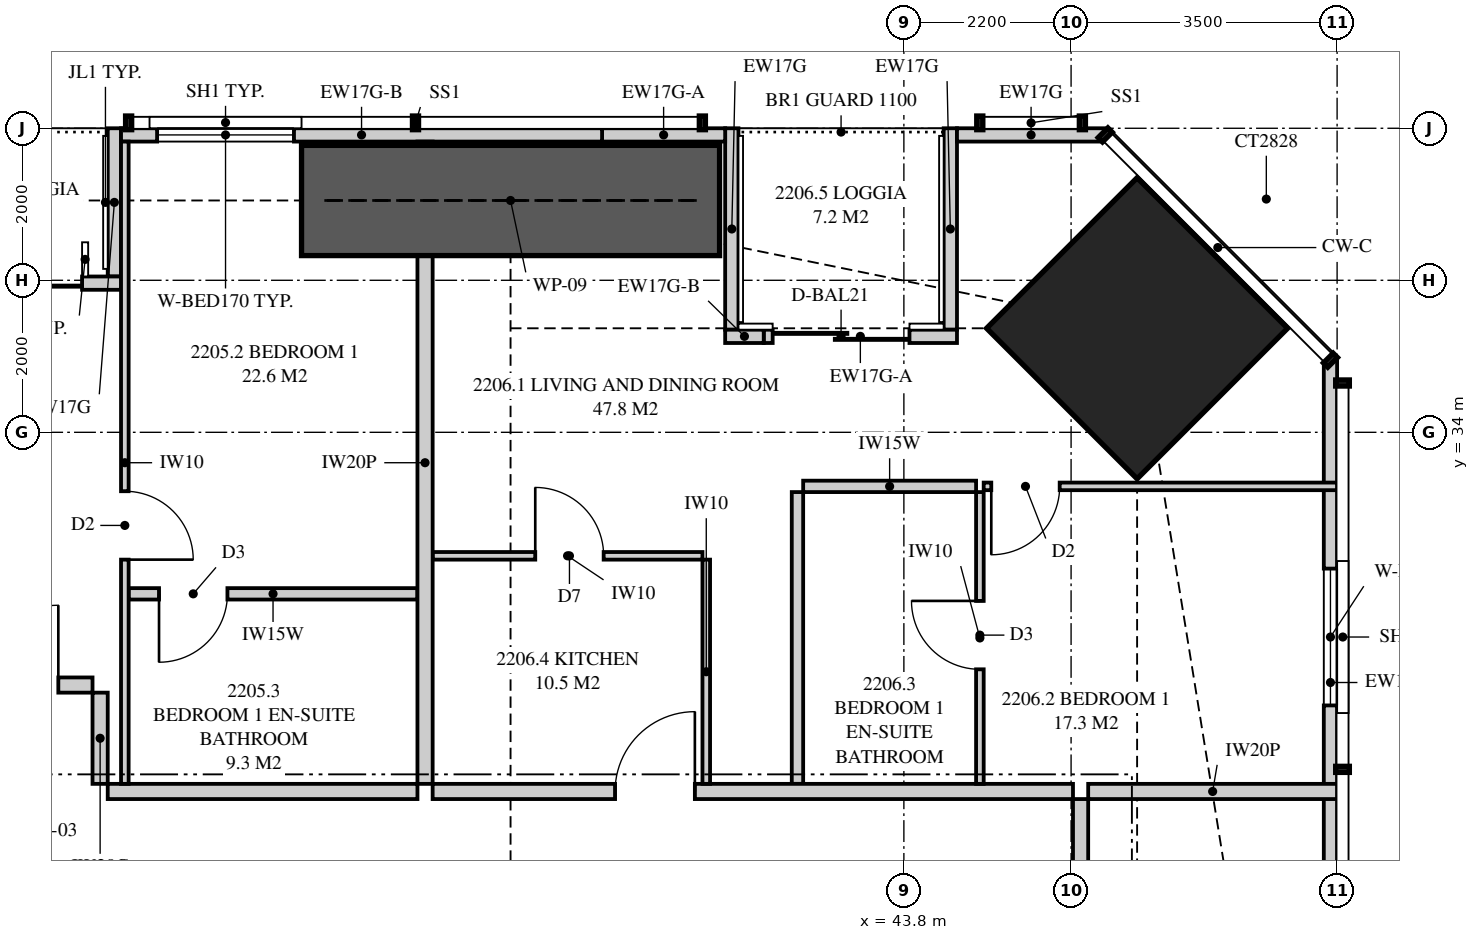
"""IFC4 building model, lengths in metres.
Left out: names, types, materials, properties, quantities, classifications, styles, units other than length and angle.
Written with IfcOpenShell. Run it as: python <this file> out.ifc"""

import sys

from ifc_helpers import new_model, si_unit, direction, frame, frame_2d, origin, origin_2d, place, context, subcontext, project, spatial, polyline, rectangle, hollow_rectangle, outline, extrude, element, fill, save


model = new_model("IFC4")
c1 = context("Model", 3, precision=1e-05, world=origin(), true_north=direction((0.0, 1.0)))
c2 = subcontext(c1, "Body", "Model", "MODEL_VIEW")
j1 = project(units=[si_unit("LENGTHUNIT", "METRE"), si_unit("PLANEANGLEUNIT", "RADIAN")], contexts=[c1])
p1 = place(None, origin())
s1 = spatial("IfcSite", under=j1, at=p1, CompositionType="ELEMENT")
p2 = place(p1, origin())
s2 = spatial("IfcBuilding", under=s1, at=p2, CompositionType="ELEMENT")
p3 = place(p2, frame((0.0, 0.0, 84.75)))
s3 = spatial("IfcBuildingStorey", under=s2, at=p3, CompositionType="ELEMENT", Elevation=84.75)
p4 = place(p3, frame((46.869, 35.369, 0.0), z_axis=(0.0, 0.0, 1.0), x_axis=(-0.707106781187, -0.707106781187, 0.0)))
e1 = element("IfcColumn", 1, at=p4, inside=s3, PredefinedType="COLUMN", context=c2, shape_type="SweptSolid", body=[
    extrude(hollow_rectangle(XDim=2.8, YDim=2.8, WallThickness=0.25, at=origin_2d()), origin(), (0.0, 0.0, 1.0), 3.35),
])
p5 = place(p3, frame((49.413, 26.468, 0.0), z_axis=(0.0, 0.0, 1.0), x_axis=(0.0, 1.0, 0.0)))
e2 = element("IfcWall", 2, at=p5, inside=s3, PredefinedType="SOLIDWALL", context=c2, shape_type="SweptSolid", body=[
    extrude(rectangle(XDim=8.481, YDim=0.175, at=frame_2d((4.24, 0.0))), origin(), (0.0, 0.0, 1.0), 3.11),
])
p6 = place(p5, frame((3.939, 0.0, 0.4)))
e3 = element("IfcOpeningElement", 3, at=p6, cuts=e2, PredefinedType="OPENING", context=c2, shape_type="SweptSolid", body=[
    extrude(rectangle(XDim=1.8, YDim=1.7, at=frame_2d((0.9, 0.85))), frame((0.0, 0.097, 0.0), z_axis=(0.0, -1.0, 0.0), x_axis=(1.0, 0.0, 0.0)), (0.0, 0.0, 1.0), 0.195),
])
p7 = place(p3, frame((46.449, 37.913, 0.0), z_axis=(0.0, 0.0, 1.0), x_axis=(-1.0, 0.0, 0.0)))
e4 = element("IfcWall", 4, at=p7, inside=s3, PredefinedType="SOLIDWALL", context=c2, shape_type="SweptSolid", body=[
    extrude(rectangle(XDim=1.95, YDim=0.175, at=frame_2d((0.975, 0.0))), origin(), (0.0, 0.0, 1.0), 3.11),
])
p8 = place(p3, frame((41.449, 37.913, 0.0), z_axis=(0.0, 0.0, 1.0), x_axis=(-1.0, 0.0, 0.0)))
e5 = element("IfcWall", 5, at=p8, inside=s3, PredefinedType="SOLIDWALL", context=c2, shape_type="SweptSolid", body=[
    extrude(rectangle(XDim=1.62, YDim=0.175, at=frame_2d((0.81, 0.0))), origin(), (0.0, 0.0, 1.0), 3.11),
])
p9 = place(p3, frame((39.829, 37.913, 0.0), z_axis=(0.0, 0.0, 1.0), x_axis=(-1.0, 0.0, 0.0)))
e6 = element("IfcWall", 6, at=p9, inside=s3, PredefinedType="SOLIDWALL", context=c2, shape_type="SweptSolid", body=[
    extrude(rectangle(XDim=6.329, YDim=0.175, at=frame_2d((3.165, 0.0))), origin(), (0.0, 0.0, 1.0), 2.15),
])
p10 = place(p9, frame((4.054, 0.0, 0.4)))
e7 = element("IfcOpeningElement", 7, at=p10, cuts=e6, PredefinedType="OPENING", context=c2, shape_type="SweptSolid", body=[
    extrude(rectangle(XDim=1.8, YDim=1.7, at=frame_2d((0.9, 0.85))), frame((0.0, 0.097, 0.0), z_axis=(0.0, -1.0, 0.0), x_axis=(1.0, 0.0, 0.0)), (0.0, 0.0, 1.0), 0.195),
])
p11 = place(p3, frame((44.499, 35.262, 0.0), z_axis=(0.0, 0.0, 1.0), x_axis=(-1.0, 0.0, 0.0)))
e8 = element("IfcWall", 8, at=p11, inside=s3, PredefinedType="SOLIDWALL", context=c2, shape_type="SweptSolid", body=[
    extrude(rectangle(XDim=2.543, YDim=0.175, at=frame_2d((1.271, 0.0))), origin(), (0.0, 0.0, 1.0), 2.15),
])
p12 = place(p11, frame((0.625, 0.0, 0.0)))
e9 = element("IfcOpeningElement", 9, at=p12, cuts=e8, PredefinedType="OPENING", context=c2, shape_type="SweptSolid", body=[
    extrude(rectangle(XDim=1.8, YDim=2.1, at=frame_2d((0.9, 1.05))), frame((0.0, 0.097, 0.0), z_axis=(0.0, -1.0, 0.0), x_axis=(1.0, 0.0, 0.0)), (0.0, 0.0, 1.0), 0.195),
])
p13 = place(p3, frame((41.956, 35.262, 0.0), z_axis=(0.0, 0.0, 1.0), x_axis=(-1.0, 0.0, 0.0)))
e10 = element("IfcWall", 10, at=p13, inside=s3, PredefinedType="SOLIDWALL", context=c2, shape_type="SweptSolid", body=[
    extrude(rectangle(XDim=0.507, YDim=0.175, at=frame_2d((0.254, 0.0))), origin(), (0.0, 0.0, 1.0), 2.51),
])
p14 = place(p3, frame((44.411, 38.0, 0.0), z_axis=(0.0, 0.0, 1.0), x_axis=(0.0, -1.0, 0.0)))
e11 = element("IfcWall", 11, at=p14, inside=s3, PredefinedType="SOLIDWALL", context=c2, shape_type="SweptSolid", body=[
    extrude(outline(polyline([(0.0, 0.0), (2.65, 0.0), (2.65, 2.15), (1.092, 2.15), (1.092, 3.11), (0.0, 3.11), (0.0, 0.0)])), frame((0.0, 0.087, 0.0), z_axis=(0.0, -1.0, 0.0), x_axis=(1.0, 0.0, 0.0)), (0.0, 0.0, 1.0), 0.175),
])
p15 = place(p3, frame((41.536, 38.0, 0.0), z_axis=(0.0, 0.0, 1.0), x_axis=(0.0, -1.0, 0.0)))
e12 = element("IfcWall", 12, at=p15, inside=s3, PredefinedType="SOLIDWALL", context=c2, shape_type="SweptSolid", body=[
    extrude(outline(polyline([(0.0, 0.0), (2.65, 0.0), (2.65, 2.51), (2.582, 2.51), (2.582, 2.15), (0.505, 2.15), (0.505, 3.11), (0.0, 3.11), (0.0, 0.0)])), frame((0.0, 0.087, 0.0), z_axis=(0.0, -1.0, 0.0), x_axis=(1.0, 0.0, 0.0)), (0.0, 0.0, 1.0), 0.175),
])
p16 = place(p3, frame((33.5, 35.962, 0.0), z_axis=(0.0, 0.0, 1.0), x_axis=(-1.0, 0.0, 0.0)))
e13 = element("IfcWall", 13, at=p16, inside=s3, PredefinedType="SOLIDWALL", context=c2, shape_type="SweptSolid", body=[
    extrude(rectangle(XDim=2.825, YDim=0.175, at=frame_2d((1.413, 0.0))), origin(), (0.0, 0.0, 1.0), 2.15),
])
p17 = place(p16, frame((0.512, 0.0, 0.0)))
e14 = element("IfcOpeningElement", 14, at=p17, cuts=e13, PredefinedType="OPENING", context=c2, shape_type="SweptSolid", body=[
    extrude(rectangle(XDim=1.8, YDim=2.1, at=frame_2d((0.9, 1.05))), frame((0.0, 0.097, 0.0), z_axis=(0.0, -1.0, 0.0), x_axis=(1.0, 0.0, 0.0)), (0.0, 0.0, 1.0), 0.195),
])
p18 = place(p3, frame((33.413, 38.0, 0.0), z_axis=(0.0, 0.0, 1.0), x_axis=(0.0, -1.0, 0.0)))
e15 = element("IfcWall", 15, at=p18, inside=s3, PredefinedType="SOLIDWALL", context=c2, shape_type="SweptSolid", body=[
    extrude(rectangle(XDim=1.95, YDim=0.175, at=frame_2d((0.975, 0.0))), origin(), (0.0, 0.0, 1.0), 2.15),
])
p19 = place(p3, frame((37.5, 37.825, 0.0), z_axis=(0.0, 0.0, 1.0), x_axis=(0.0, -1.0, 0.0)))
e16 = element("IfcWall", 16, at=p19, inside=s3, PredefinedType="PARTITIONING", context=c2, shape_type="SweptSolid", body=[
    extrude(outline(polyline([(0.529, 2.15), (0.0, 2.15), (0.0, 0.0), (0.529, 0.0), (0.529, 0.431), (1.021, 0.431), (1.021, 0.0), (8.45, 0.0), (8.45, 3.11), (1.885, 3.11), (1.885, 2.15), (1.021, 2.15), (1.021, 1.269), (0.529, 1.269), (0.529, 2.15)])), frame((0.0, 0.1, 0.0), z_axis=(0.0, -1.0, 0.0), x_axis=(1.0, 0.0, 0.0)), (0.0, 0.0, 1.0), 0.2),
])
p20 = place(p3, frame((33.55, 37.825, 0.0), z_axis=(0.0, 0.0, 1.0), x_axis=(0.0, -1.0, 0.0)))
e17 = element("IfcWall", 17, at=p20, inside=s3, PredefinedType="PARTITIONING", context=c2, shape_type="SweptSolid", body=[
    extrude(outline(polyline([(0.0, 0.0), (8.45, 0.0), (8.45, 3.11), (1.835, 3.11), (1.835, 2.15), (0.0, 2.15), (0.0, 3.11), (0.0, 0.0)])), frame((0.0, 0.05, 0.0), z_axis=(0.0, -1.0, 0.0), x_axis=(1.0, 0.0, 0.0)), (0.0, 0.0, 1.0), 0.1),
])
p21 = place(p20, frame((4.6, 0.0, 0.0)))
e18 = element("IfcOpeningElement", 18, at=p21, cuts=e17, PredefinedType="OPENING", context=c2, shape_type="SweptSolid", body=[
    extrude(rectangle(XDim=0.9, YDim=2.1, at=frame_2d((0.45, 1.05))), frame((0.0, 0.06, 0.0), z_axis=(0.0, -1.0, 0.0), x_axis=(1.0, 0.0, 0.0)), (0.0, 0.0, 1.0), 0.12),
])
p22 = place(p3, frame((33.6, 31.875, 0.0), z_axis=(0.0, 0.0, 1.0), x_axis=(1.0, 0.0, 0.0)))
e19 = element("IfcWall", 19, at=p22, inside=s3, PredefinedType="PLUMBINGWALL", context=c2, shape_type="SweptSolid", body=[
    extrude(rectangle(XDim=3.8, YDim=0.15, at=frame_2d((1.9, 0.0))), origin(), (0.0, 0.0, 1.0), 3.11),
])
p23 = place(p22, frame((0.4, 0.0, 0.0)))
e20 = element("IfcOpeningElement", 20, at=p23, cuts=e19, PredefinedType="OPENING", context=c2, shape_type="SweptSolid", body=[
    extrude(rectangle(XDim=0.9, YDim=2.1, at=frame_2d((0.45, 1.05))), frame((0.0, 0.085, 0.0), z_axis=(0.0, -1.0, 0.0), x_axis=(1.0, 0.0, 0.0)), (0.0, 0.0, 1.0), 0.17),
])
p24 = place(p3, frame((37.6, 29.275, 0.0), z_axis=(0.0, 0.0, 1.0), x_axis=(1.0, 0.0, 0.0)))
e21 = element("IfcWall", 21, at=p24, inside=s3, PredefinedType="PARTITIONING", context=c2, shape_type="SweptSolid", body=[
    extrude(outline(polyline([(0.0, 0.0), (8.425, 0.0), (8.425, 3.11), (1.371, 3.11), (1.371, 2.531), (0.679, 2.531), (0.679, 3.11), (0.0, 3.11), (0.0, 0.0)])), frame((0.0, 0.1, 0.0), z_axis=(0.0, -1.0, 0.0), x_axis=(1.0, 0.0, 0.0)), (0.0, 0.0, 1.0), 0.2),
])
p25 = place(p24, frame((2.4, 0.0, 0.0)))
e22 = element("IfcOpeningElement", 22, at=p25, cuts=e21, PredefinedType="OPENING", context=c2, shape_type="SweptSolid", body=[
    extrude(rectangle(XDim=1.05, YDim=2.2, at=frame_2d((0.525, 1.1))), frame((0.0, 0.11, 0.0), z_axis=(0.0, -1.0, 0.0), x_axis=(1.0, 0.0, 0.0)), (0.0, 0.0, 1.0), 0.22),
])
p26 = place(p3, frame((44.8, 33.214, 0.0), z_axis=(0.0, 0.0, 1.0), x_axis=(0.0, -1.0, 0.0)))
e23 = element("IfcWall", 23, at=p26, inside=s3, PredefinedType="PARTITIONING", context=c2, shape_type="SweptSolid", body=[
    extrude(rectangle(XDim=3.839, YDim=0.1, at=frame_2d((1.919, 0.0))), origin(), (0.0, 0.0, 1.0), 3.11),
])
p27 = place(p26, frame((1.432, 0.0, 0.0)))
e24 = element("IfcOpeningElement", 24, at=p27, cuts=e23, PredefinedType="OPENING", context=c2, shape_type="SweptSolid", body=[
    extrude(rectangle(XDim=0.9, YDim=2.1, at=frame_2d((0.45, 1.05))), frame((0.0, 0.06, 0.0), z_axis=(0.0, -1.0, 0.0), x_axis=(1.0, 0.0, 0.0)), (0.0, 0.0, 1.0), 0.12),
])
p28 = place(p3, frame((44.85, 33.289, 0.0), z_axis=(0.0, 0.0, 1.0), x_axis=(1.0, 0.0, 0.0)))
e25 = element("IfcWall", 25, at=p28, inside=s3, PredefinedType="PARTITIONING", context=c2, shape_type="SweptSolid", body=[
    extrude(outline(polyline([(0.0, 0.0), (4.65, 0.0), (4.65, 3.11), (3.43, 3.11), (3.43, 2.15), (1.282, 2.15), (1.282, 3.11), (0.0, 3.11), (0.0, 0.0)])), frame((0.0, 0.05, 0.0), z_axis=(0.0, -1.0, 0.0), x_axis=(1.0, 0.0, 0.0)), (0.0, 0.0, 1.0), 0.1),
])
p29 = place(p28, frame((0.1, 0.0, 0.0)))
e26 = element("IfcOpeningElement", 26, at=p29, cuts=e25, PredefinedType="OPENING", context=c2, shape_type="SweptSolid", body=[
    extrude(rectangle(XDim=0.9, YDim=2.1, at=frame_2d((0.45, 1.05))), frame((0.0, 0.06, 0.0), z_axis=(0.0, -1.0, 0.0), x_axis=(1.0, 0.0, 0.0)), (0.0, 0.0, 1.0), 0.12),
])
p30 = place(p3, frame((42.475, 33.289, 0.0), z_axis=(0.0, 0.0, 1.0), x_axis=(1.0, 0.0, 0.0)))
e27 = element("IfcWall", 27, at=p30, inside=s3, PredefinedType="PLUMBINGWALL", context=c2, shape_type="SweptSolid", body=[
    extrude(rectangle(XDim=2.275, YDim=0.15, at=frame_2d((1.137, 0.0))), origin(), (0.0, 0.0, 1.0), 3.11),
])
p31 = place(p3, frame((42.4, 33.214, 0.0), z_axis=(0.0, 0.0, 1.0), x_axis=(0.0, -1.0, 0.0)))
e28 = element("IfcWall", 28, at=p31, inside=s3, PredefinedType="PLUMBINGWALL", context=c2, shape_type="SweptSolid", body=[
    extrude(rectangle(XDim=3.839, YDim=0.15, at=frame_2d((1.919, 0.0))), origin(), (0.0, 0.0, 1.0), 3.11),
])
p32 = place(p3, frame((37.6, 32.375, 0.0), z_axis=(0.0, 0.0, 1.0), x_axis=(1.0, 0.0, 0.0)))
e29 = element("IfcWall", 29, at=p32, inside=s3, PredefinedType="PARTITIONING", context=c2, shape_type="SweptSolid", body=[
    extrude(outline(polyline([(0.0, 0.0), (3.55, 0.0), (3.55, 3.11), (1.321, 3.11), (1.321, 2.531), (0.729, 2.531), (0.729, 3.11), (0.0, 3.11), (0.0, 0.0)])), frame((0.0, 0.05, 0.0), z_axis=(0.0, -1.0, 0.0), x_axis=(1.0, 0.0, 0.0)), (0.0, 0.0, 1.0), 0.1),
])
p33 = place(p32, frame((1.35, 0.0, 0.0)))
e30 = element("IfcOpeningElement", 30, at=p33, cuts=e29, PredefinedType="OPENING", context=c2, shape_type="SweptSolid", body=[
    extrude(rectangle(XDim=0.9, YDim=2.1, at=frame_2d((0.45, 1.05))), frame((0.0, 0.06, 0.0), z_axis=(0.0, -1.0, 0.0), x_axis=(1.0, 0.0, 0.0)), (0.0, 0.0, 1.0), 0.12),
])
p34 = place(p3, frame((41.2, 32.325, 0.0), z_axis=(0.0, 0.0, 1.0), x_axis=(0.0, -1.0, 0.0)))
e31 = element("IfcWall", 31, at=p34, inside=s3, PredefinedType="PARTITIONING", context=c2, shape_type="SweptSolid", body=[
    extrude(rectangle(XDim=2.95, YDim=0.1, at=frame_2d((1.475, 0.0))), origin(), (0.0, 0.0, 1.0), 3.11),
])
p35 = place(p3, frame((46.225, 29.275, 0.0), z_axis=(0.0, 0.0, 1.0), x_axis=(1.0, 0.0, 0.0)))
e32 = element("IfcWall", 32, at=p35, inside=s3, PredefinedType="PARTITIONING", context=c2, shape_type="SweptSolid", body=[
    extrude(outline(polyline([(0.0, 0.0), (3.275, 0.0), (3.275, 3.11), (2.756, 3.11), (2.756, 2.15), (0.603, 2.15), (0.603, 2.531), (0.297, 2.531), (0.297, 3.11), (0.0, 3.11), (0.0, 0.0)])), frame((0.0, 0.1, 0.0), z_axis=(0.0, -1.0, 0.0), x_axis=(1.0, 0.0, 0.0)), (0.0, 0.0, 1.0), 0.2),
])
p36 = place(p3, frame((33.325, 29.275, 0.0), z_axis=(0.0, 0.0, 1.0), x_axis=(1.0, 0.0, 0.0)))
e33 = element("IfcWall", 33, at=p36, inside=s3, PredefinedType="PARTITIONING", context=c2, shape_type="SweptSolid", body=[
    extrude(rectangle(XDim=4.075, YDim=0.2, at=frame_2d((2.038, 0.0))), origin(), (0.0, 0.0, 1.0), 3.11),
])
p37 = place(p3, frame((30.725, 30.675, 0.0), z_axis=(0.0, 0.0, 1.0), x_axis=(1.0, 0.0, 0.0)))
e34 = element("IfcWall", 34, at=p37, inside=s3, PredefinedType="PARTITIONING", context=c2, shape_type="SweptSolid", body=[
    extrude(rectangle(XDim=2.4, YDim=0.2, at=frame_2d((1.2, 0.0))), origin(), (0.0, 0.0, 1.0), 3.11),
])
p38 = place(p37, frame((0.9, 0.0, 0.0)))
e35 = element("IfcOpeningElement", 35, at=p38, cuts=e34, PredefinedType="OPENING", context=c2, shape_type="SweptSolid", body=[
    extrude(rectangle(XDim=1.05, YDim=2.2, at=frame_2d((0.525, 1.1))), frame((0.0, 0.11, 0.0), z_axis=(0.0, -1.0, 0.0), x_axis=(1.0, 0.0, 0.0)), (0.0, 0.0, 1.0), 0.22),
])
p39 = place(p3, frame((33.225, 29.375, 0.0), z_axis=(0.0, 0.0, 1.0), x_axis=(0.0, 1.0, 0.0)))
e36 = element("IfcWall", 36, at=p39, inside=s3, PredefinedType="PARTITIONING", context=c2, shape_type="SweptSolid", body=[
    extrude(rectangle(XDim=1.2, YDim=0.2, at=frame_2d((0.6, 0.0))), origin(), (0.0, 0.0, 1.0), 3.11),
])
p40 = place(p3, frame((46.125, 20.7, 0.0), z_axis=(0.0, 0.0, 1.0), x_axis=(0.0, 1.0, 0.0)))
e37 = element("IfcWall", 37, at=p40, inside=s3, PredefinedType="PARTITIONING", context=c2, shape_type="SweptSolid", body=[
    extrude(outline(polyline([(0.0, 0.0), (8.475, 0.0), (8.475, 3.11), (4.646, 3.11), (4.646, 2.531), (3.954, 2.531), (3.954, 3.11), (0.0, 3.11), (0.0, 0.0)])), frame((0.0, 0.1, 0.0), z_axis=(0.0, -1.0, 0.0), x_axis=(1.0, 0.0, 0.0)), (0.0, 0.0, 1.0), 0.2),
])
p41 = place(p40, frame((6.625, 0.0, 0.0)))
e38 = element("IfcOpeningElement", 38, at=p41, cuts=e37, PredefinedType="OPENING", context=c2, shape_type="SweptSolid", body=[
    extrude(rectangle(XDim=1.0, YDim=2.1, at=frame_2d((0.5, 1.05))), frame((0.0, 0.11, 0.0), z_axis=(0.0, -1.0, 0.0), x_axis=(1.0, 0.0, 0.0)), (0.0, 0.0, 1.0), 0.22),
])
p42 = place(p3, frame((35.875, 37.05, 0.0), z_axis=(0.0, 0.0, 1.0), x_axis=(1.0, 0.0, 0.0)))
e39 = element("IfcWall", 39, at=p42, inside=s3, PredefinedType="SHEAR", context=c2, shape_type="SweptSolid", body=[
    extrude(rectangle(XDim=5.5, YDim=1.45, at=frame_2d((2.75, 0.0))), origin(), (0.0, 0.0, 1.0), 3.35),
])
p43 = place(p6, origin())
e40 = element("IfcWindow", 40, at=p43, inside=s3, PartitioningType="SINGLE_PANEL", PredefinedType="WINDOW", context=c2, shape_type="SweptSolid", body=[
    extrude(rectangle(XDim=1.8, YDim=1.7, at=frame_2d((0.9, 0.85))), frame((0.0, 0.03, 0.0), z_axis=(0.0, -1.0, 0.0), x_axis=(1.0, 0.0, 0.0)), (0.0, 0.0, 1.0), 0.06),
])
fill(e3, e40)
p44 = place(p12, origin())
e41 = element("IfcDoor", 41, at=p44, inside=s3, OperationType="SLIDING_TO_LEFT", PredefinedType="DOOR", context=c2, shape_type="SweptSolid", body=[
    extrude(rectangle(XDim=1.8, YDim=2.1, at=frame_2d((0.9, 1.05))), frame((0.0, 0.025, 0.0), z_axis=(0.0, -1.0, 0.0), x_axis=(1.0, 0.0, 0.0)), (0.0, 0.0, 1.0), 0.05),
])
fill(e9, e41)
p45 = place(p10, origin())
e42 = element("IfcWindow", 42, at=p45, inside=s3, PartitioningType="SINGLE_PANEL", PredefinedType="WINDOW", context=c2, shape_type="SweptSolid", body=[
    extrude(rectangle(XDim=1.8, YDim=1.7, at=frame_2d((0.9, 0.85))), frame((0.0, 0.03, 0.0), z_axis=(0.0, -1.0, 0.0), x_axis=(1.0, 0.0, 0.0)), (0.0, 0.0, 1.0), 0.06),
])
fill(e7, e42)
p46 = place(p17, origin())
e43 = element("IfcDoor", 43, at=p46, inside=s3, OperationType="SLIDING_TO_LEFT", PredefinedType="DOOR", context=c2, shape_type="SweptSolid", body=[
    extrude(rectangle(XDim=1.8, YDim=2.1, at=frame_2d((0.9, 1.05))), frame((0.0, 0.025, 0.0), z_axis=(0.0, -1.0, 0.0), x_axis=(1.0, 0.0, 0.0)), (0.0, 0.0, 1.0), 0.05),
])
fill(e14, e43)
p47 = place(p38, origin())
e44 = element("IfcDoor", 44, at=p47, inside=s3, OperationType="SINGLE_SWING_RIGHT", PredefinedType="DOOR", context=c2, shape_type="SweptSolid", body=[
    extrude(rectangle(XDim=1.05, YDim=2.2, at=frame_2d((0.525, 1.1))), frame((0.0, 0.025, 0.0), z_axis=(0.0, -1.0, 0.0), x_axis=(1.0, 0.0, 0.0)), (0.0, 0.0, 1.0), 0.05),
])
fill(e35, e44)
p48 = place(p21, origin())
e45 = element("IfcDoor", 45, at=p48, inside=s3, OperationType="SINGLE_SWING_RIGHT", PredefinedType="DOOR", context=c2, shape_type="SweptSolid", body=[
    extrude(rectangle(XDim=0.9, YDim=2.1, at=frame_2d((0.45, 1.05))), frame((0.0, 0.025, 0.0), z_axis=(0.0, -1.0, 0.0), x_axis=(1.0, 0.0, 0.0)), (0.0, 0.0, 1.0), 0.05),
])
fill(e18, e45)
p49 = place(p23, frame((0.9, 0.0, 0.0), z_axis=(0.0, 0.0, 1.0), x_axis=(-1.0, 0.0, 0.0)))
e46 = element("IfcDoor", 46, at=p49, inside=s3, OperationType="SINGLE_SWING_RIGHT", PredefinedType="DOOR", context=c2, shape_type="SweptSolid", body=[
    extrude(rectangle(XDim=0.9, YDim=2.1, at=frame_2d((0.45, 1.05))), frame((0.0, 0.025, 0.0), z_axis=(0.0, -1.0, 0.0), x_axis=(1.0, 0.0, 0.0)), (0.0, 0.0, 1.0), 0.05),
])
fill(e20, e46)
p50 = place(p25, origin())
e47 = element("IfcDoor", 47, at=p50, inside=s3, OperationType="SINGLE_SWING_RIGHT", PredefinedType="DOOR", context=c2, shape_type="SweptSolid", body=[
    extrude(rectangle(XDim=1.05, YDim=2.2, at=frame_2d((0.525, 1.1))), frame((0.0, 0.025, 0.0), z_axis=(0.0, -1.0, 0.0), x_axis=(1.0, 0.0, 0.0)), (0.0, 0.0, 1.0), 0.05),
])
fill(e22, e47)
p51 = place(p29, frame((0.9, 0.0, 0.0), z_axis=(0.0, 0.0, 1.0), x_axis=(-1.0, 0.0, 0.0)))
e48 = element("IfcDoor", 48, at=p51, inside=s3, OperationType="SINGLE_SWING_RIGHT", PredefinedType="DOOR", context=c2, shape_type="SweptSolid", body=[
    extrude(rectangle(XDim=0.9, YDim=2.1, at=frame_2d((0.45, 1.05))), frame((0.0, 0.025, 0.0), z_axis=(0.0, -1.0, 0.0), x_axis=(1.0, 0.0, 0.0)), (0.0, 0.0, 1.0), 0.05),
])
fill(e26, e48)
p52 = place(p27, frame((0.9, 0.0, 0.0), z_axis=(0.0, 0.0, 1.0), x_axis=(-1.0, 0.0, 0.0)))
e49 = element("IfcDoor", 49, at=p52, inside=s3, OperationType="SINGLE_SWING_RIGHT", PredefinedType="DOOR", context=c2, shape_type="SweptSolid", body=[
    extrude(rectangle(XDim=0.9, YDim=2.1, at=frame_2d((0.45, 1.05))), frame((0.0, 0.025, 0.0), z_axis=(0.0, -1.0, 0.0), x_axis=(1.0, 0.0, 0.0)), (0.0, 0.0, 1.0), 0.05),
])
fill(e24, e49)
p53 = place(p33, origin())
e50 = element("IfcDoor", 50, at=p53, inside=s3, OperationType="SINGLE_SWING_LEFT", PredefinedType="DOOR", context=c2, shape_type="SweptSolid", body=[
    extrude(rectangle(XDim=0.9, YDim=2.1, at=frame_2d((0.45, 1.05))), frame((0.0, 0.025, 0.0), z_axis=(0.0, -1.0, 0.0), x_axis=(1.0, 0.0, 0.0)), (0.0, 0.0, 1.0), 0.05),
])
fill(e30, e50)
save(model, sys.argv[1])
